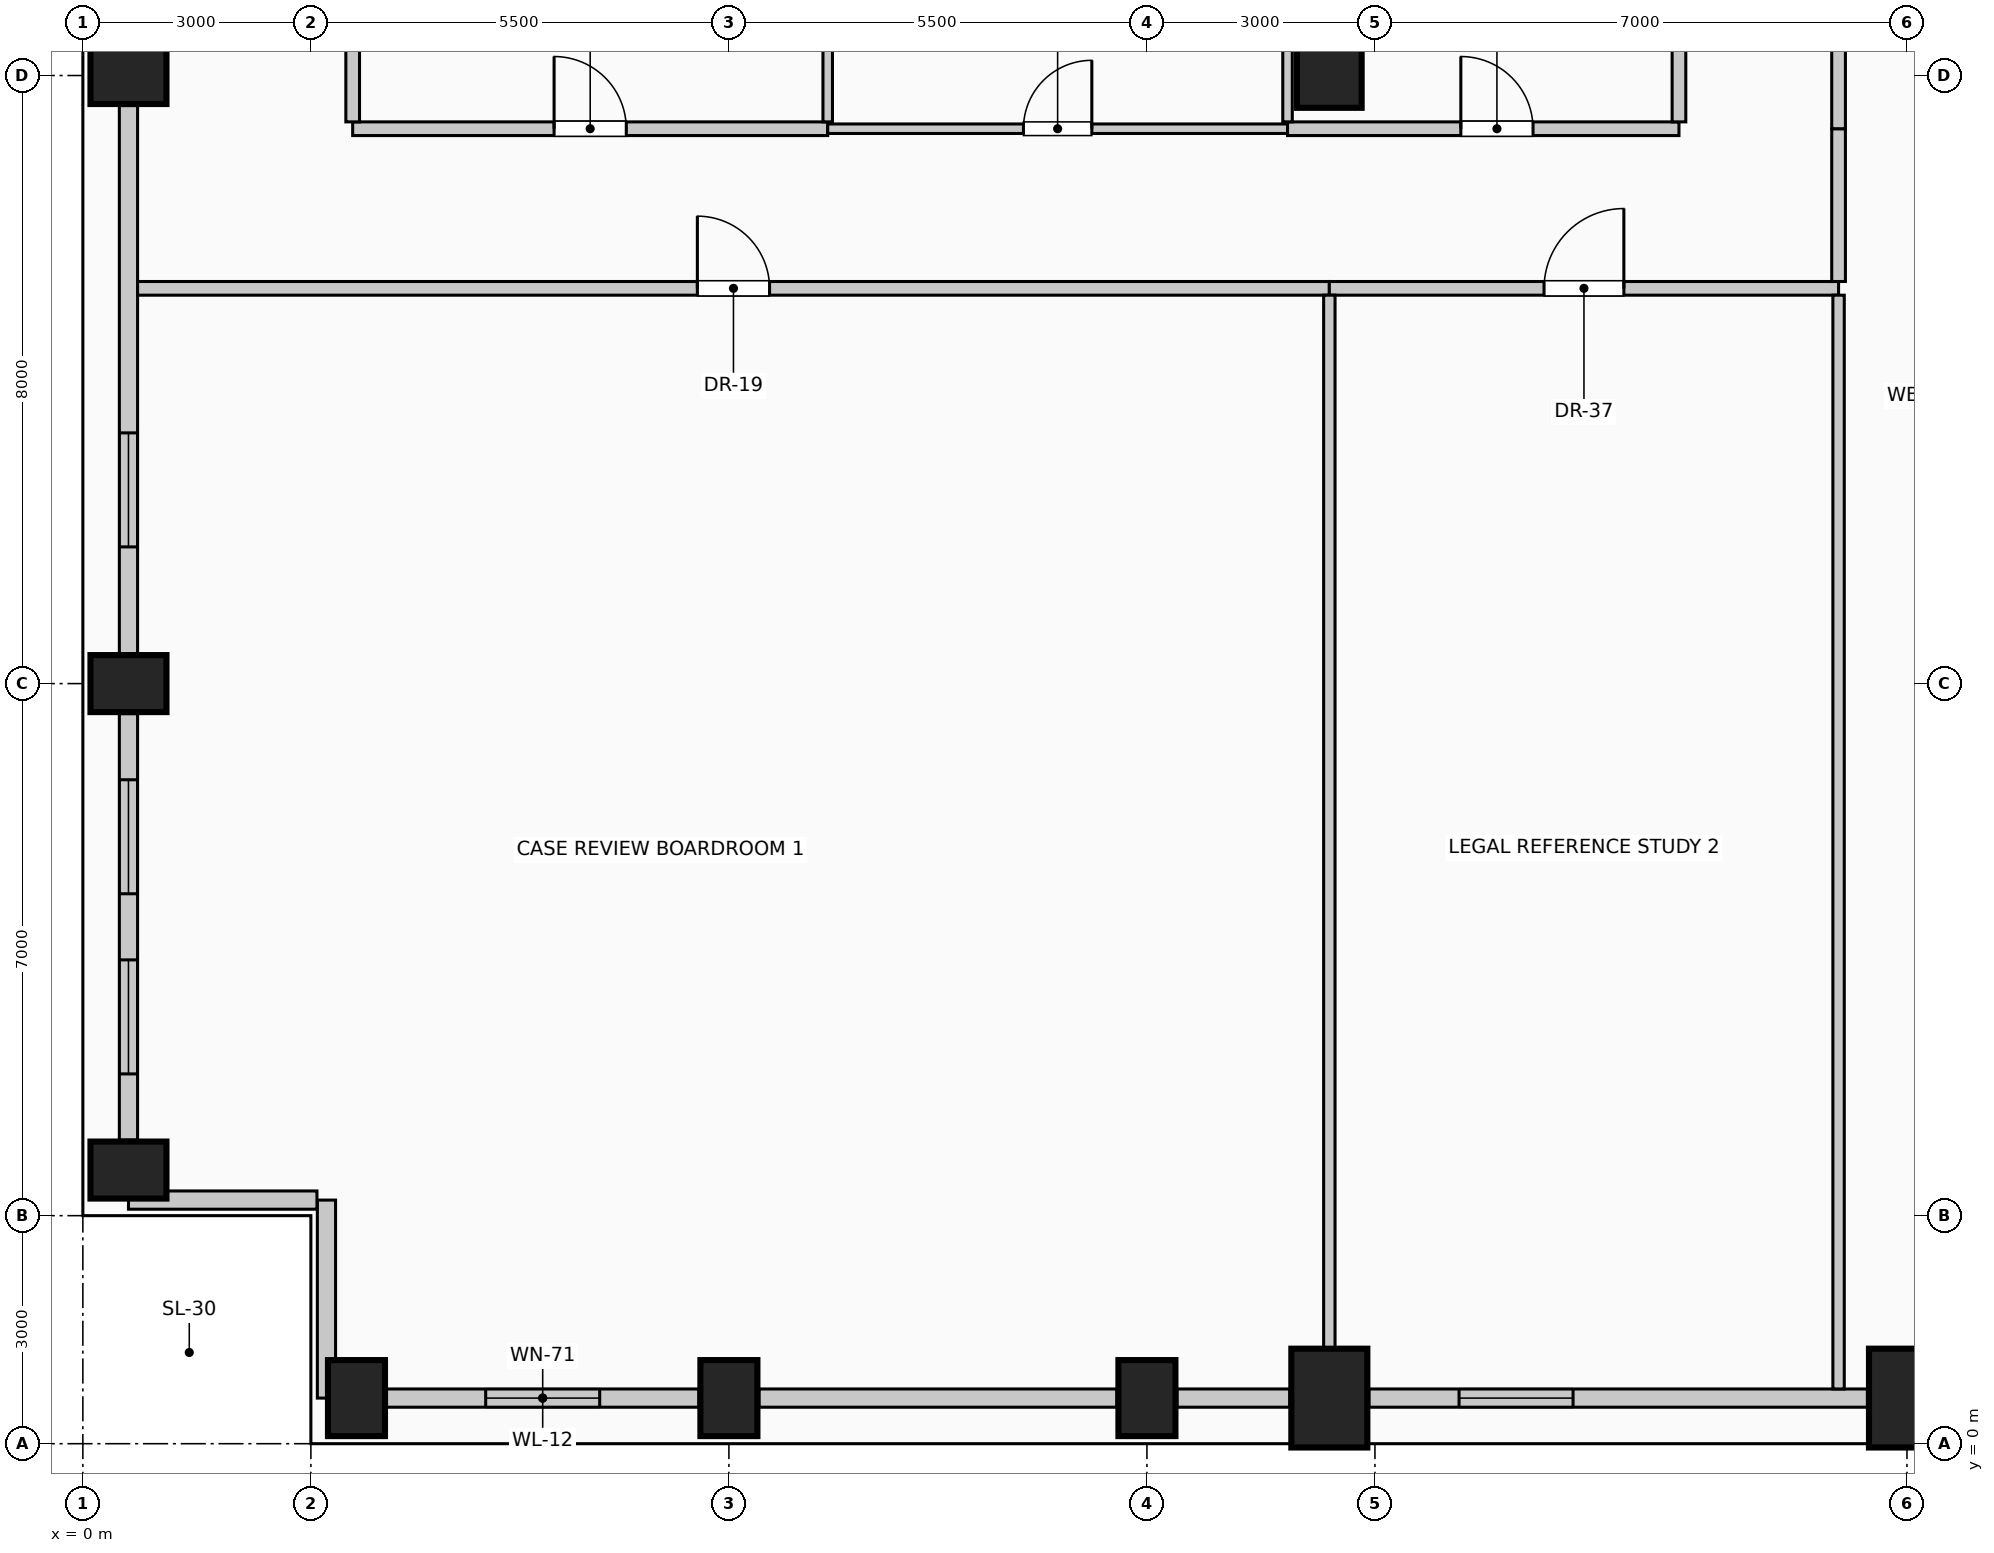
"""IFC4 building model, lengths in metres.
Left out: names, types, materials, properties, quantities, classifications, styles, units other than length and angle.
Written with IfcOpenShell. Run it as: python <this file> out.ifc"""

import sys

from ifc_helpers import new_model, si_unit, direction, frame, frame_2d, origin, origin_2d, place, context, subcontext, project, spatial, rectangle, circle, extrude, element, fill, save


model = new_model("IFC4")
c1 = context("Model", 3, precision=1e-05, world=origin(), true_north=direction((0.0, 1.0)))
c2 = subcontext(c1, "Body", "Model", "MODEL_VIEW")
j1 = project(units=[si_unit("LENGTHUNIT", "METRE"), si_unit("PLANEANGLEUNIT", "RADIAN")], contexts=[c1])
p1 = place(None, origin())
s1 = spatial("IfcSite", under=j1, at=p1, CompositionType="ELEMENT")
p2 = place(p1, origin())
s2 = spatial("IfcBuilding", under=s1, at=p2, CompositionType="ELEMENT")
p3 = place(p2, frame((0.0, 0.0, 234.6)))
s3 = spatial("IfcBuildingStorey", under=s2, at=p3, CompositionType="ELEMENT", Elevation=234.6)
for number, where, z_axis, x_axis in (
    (1, (3.6, 0.6, 0.0), (0.0, 0.0, 1.0), (1.0, 0.0, 0.0)),
    (2, (8.5, 0.6, 0.0), (0.0, 0.0, 1.0), (1.0, 0.0, 0.0)),
    (3, (14.0, 0.6, 0.0), (0.0, 0.0, 1.0), (1.0, 0.0, 0.0)),
):
    element("IfcColumn", number, at=place(p3, frame(where, z_axis=z_axis, x_axis=x_axis)), inside=s3, PredefinedType="COLUMN", context=c2, shape_type="SweptSolid", body=[
        extrude(rectangle(XDim=0.75, YDim=1.0, at=origin_2d()), origin(), (0.0, 0.0, 1.0), 4.0),
    ])
for number, where, z_axis, x_axis in (
    (4, (16.4, 0.6, 0.0), (0.0, 0.0, 1.0), (1.0, 0.0, 0.0)),
    (5, (24.0, 0.6, 0.0), (0.0, 0.0, 1.0), (1.0, 0.0, 0.0)),
):
    element("IfcColumn", number, at=place(p3, frame(where, z_axis=z_axis, x_axis=x_axis)), inside=s3, PredefinedType="COLUMN", context=c2, shape_type="SweptSolid", body=[
        extrude(rectangle(XDim=1.0, YDim=1.3, at=origin_2d()), origin(), (0.0, 0.0, 1.0), 4.0),
    ])
for number, where, z_axis, x_axis in (
    (6, (0.6, 3.6, 0.0), (0.0, 0.0, 1.0), (0.0, 1.0, 0.0)),
    (7, (0.6, 10.0, 0.0), (0.0, 0.0, 1.0), (0.0, 1.0, 0.0)),
    (8, (0.6, 18.0, 0.0), (0.0, 0.0, 1.0), (0.0, 1.0, 0.0)),
):
    element("IfcColumn", number, at=place(p3, frame(where, z_axis=z_axis, x_axis=x_axis)), inside=s3, PredefinedType="COLUMN", context=c2, shape_type="SweptSolid", body=[
        extrude(rectangle(XDim=0.75, YDim=1.0, at=origin_2d()), origin(), (0.0, 0.0, 1.0), 4.0),
    ])
p4 = place(p3, frame((16.4, 18.0, 0.0), z_axis=(0.0, 0.0, 1.0), x_axis=(1.0, 0.0, 0.0)))
e9 = element("IfcColumn", 9, at=p4, inside=s3, PredefinedType="COLUMN", context=c2, shape_type="SweptSolid", body=[
    extrude(circle(Radius=0.425, at=origin_2d()), origin(), (0.0, 0.0, 1.0), 4.0),
])
p5 = place(p3, frame((8.105, 0.6, 0.0), z_axis=(0.0, 0.0, 1.0), x_axis=(-1.0, 0.0, 0.0)))
e10 = element("IfcWall", 10, at=p5, inside=s3, PredefinedType="SOLIDWALL", context=c2, shape_type="SweptSolid", body=[
    extrude(rectangle(XDim=4.11, YDim=0.24, at=frame_2d((2.055, 0.0))), origin(), (0.0, 0.0, 1.0), 2.91),
])
p6 = place(p5, frame((1.305, 0.0, 0.42)))
e11 = element("IfcOpeningElement", 11, at=p6, cuts=e10, PredefinedType="OPENING", context=c2, shape_type="SweptSolid", body=[
    extrude(rectangle(XDim=1.5, YDim=2.2, at=frame_2d((0.75, 1.1))), frame((0.0, 0.13, 0.0), z_axis=(0.0, -1.0, 0.0), x_axis=(1.0, 0.0, 0.0)), (0.0, 0.0, 1.0), 0.26),
])
p7 = place(p3, frame((13.605, 0.6, 0.0), z_axis=(0.0, 0.0, 1.0), x_axis=(-1.0, 0.0, 0.0)))
e12 = element("IfcWall", 12, at=p7, inside=s3, PredefinedType="SOLIDWALL", context=c2, shape_type="SweptSolid", body=[
    extrude(rectangle(XDim=4.71, YDim=0.24, at=frame_2d((2.355, 0.0))), origin(), (0.0, 0.0, 1.0), 2.91),
])
p8 = place(p3, frame((15.88, 0.6, 0.0), z_axis=(0.0, 0.0, 1.0), x_axis=(-1.0, 0.0, 0.0)))
e13 = element("IfcWall", 13, at=p8, inside=s3, PredefinedType="SOLIDWALL", context=c2, shape_type="SweptSolid", body=[
    extrude(rectangle(XDim=1.485, YDim=0.24, at=frame_2d((0.742, 0.0))), origin(), (0.0, 0.0, 1.0), 2.91),
])
p9 = place(p3, frame((23.48, 0.6, 0.0), z_axis=(0.0, 0.0, 1.0), x_axis=(-1.0, 0.0, 0.0)))
e14 = element("IfcWall", 14, at=p9, inside=s3, PredefinedType="SOLIDWALL", context=c2, shape_type="SweptSolid", body=[
    extrude(rectangle(XDim=6.56, YDim=0.24, at=frame_2d((3.28, 0.0))), origin(), (0.0, 0.0, 1.0), 2.91),
])
p10 = place(p9, frame((3.873, 0.0, 0.42)))
e15 = element("IfcOpeningElement", 15, at=p10, cuts=e14, PredefinedType="OPENING", context=c2, shape_type="SweptSolid", body=[
    extrude(rectangle(XDim=1.5, YDim=2.2, at=frame_2d((0.75, 1.1))), frame((0.0, 0.13, 0.0), z_axis=(0.0, -1.0, 0.0), x_axis=(1.0, 0.0, 0.0)), (0.0, 0.0, 1.0), 0.26),
])
p11 = place(p3, frame((0.6, 3.995, 0.0), z_axis=(0.0, 0.0, 1.0), x_axis=(0.0, 1.0, 0.0)))
e16 = element("IfcWall", 16, at=p11, inside=s3, PredefinedType="SOLIDWALL", context=c2, shape_type="SweptSolid", body=[
    extrude(rectangle(XDim=5.61, YDim=0.24, at=frame_2d((2.805, 0.0))), origin(), (0.0, 0.0, 1.0), 2.91),
])
p12 = place(p11, frame((0.87, 0.0, 0.42)))
e17 = element("IfcOpeningElement", 17, at=p12, cuts=e16, PredefinedType="OPENING", context=c2, shape_type="SweptSolid", body=[
    extrude(rectangle(XDim=1.5, YDim=2.2, at=frame_2d((0.75, 1.1))), frame((0.0, 0.13, 0.0), z_axis=(0.0, -1.0, 0.0), x_axis=(1.0, 0.0, 0.0)), (0.0, 0.0, 1.0), 0.26),
])
p13 = place(p11, frame((3.24, 0.0, 0.42)))
e18 = element("IfcOpeningElement", 18, at=p13, cuts=e16, PredefinedType="OPENING", context=c2, shape_type="SweptSolid", body=[
    extrude(rectangle(XDim=1.5, YDim=2.2, at=frame_2d((0.75, 1.1))), frame((0.0, 0.13, 0.0), z_axis=(0.0, -1.0, 0.0), x_axis=(1.0, 0.0, 0.0)), (0.0, 0.0, 1.0), 0.26),
])
p14 = place(p3, frame((0.6, 10.395, 0.0), z_axis=(0.0, 0.0, 1.0), x_axis=(0.0, 1.0, 0.0)))
e19 = element("IfcWall", 19, at=p14, inside=s3, PredefinedType="SOLIDWALL", context=c2, shape_type="SweptSolid", body=[
    extrude(rectangle(XDim=7.21, YDim=0.24, at=frame_2d((3.605, 0.0))), origin(), (0.0, 0.0, 1.0), 2.91),
])
p15 = place(p14, frame((1.403, 0.0, 0.42)))
e20 = element("IfcOpeningElement", 20, at=p15, cuts=e19, PredefinedType="OPENING", context=c2, shape_type="SweptSolid", body=[
    extrude(rectangle(XDim=1.5, YDim=2.2, at=frame_2d((0.75, 1.1))), frame((0.0, 0.13, 0.0), z_axis=(0.0, -1.0, 0.0), x_axis=(1.0, 0.0, 0.0)), (0.0, 0.0, 1.0), 0.26),
])
p16 = place(p3, frame((3.205, 0.6, 0.0), z_axis=(0.0, 0.0, 1.0), x_axis=(0.0, 1.0, 0.0)))
e21 = element("IfcWall", 21, at=p16, inside=s3, PredefinedType="SOLIDWALL", context=c2, shape_type="SweptSolid", body=[
    extrude(rectangle(XDim=2.605, YDim=0.24, at=frame_2d((1.302, 0.0))), origin(), (0.0, 0.0, 1.0), 3.66),
])
p17 = place(p3, frame((3.08, 3.205, 0.0), z_axis=(0.0, 0.0, 1.0), x_axis=(-1.0, 0.0, 0.0)))
e22 = element("IfcWall", 22, at=p17, inside=s3, PredefinedType="SOLIDWALL", context=c2, shape_type="SweptSolid", body=[
    extrude(rectangle(XDim=2.48, YDim=0.24, at=frame_2d((1.24, 0.0))), origin(), (0.0, 0.0, 1.0), 3.66),
])
p18 = place(p3, frame((0.72, 15.2, 0.0), z_axis=(0.0, 0.0, 1.0), x_axis=(1.0, 0.0, 0.0)))
e23 = element("IfcWall", 23, at=p18, inside=s3, PredefinedType="PARTITIONING", context=c2, shape_type="SweptSolid", body=[
    extrude(rectangle(XDim=15.68, YDim=0.18, at=frame_2d((7.84, 0.0))), origin(), (0.0, 0.0, 1.0), 3.66),
])
p19 = place(p18, frame((7.365, 0.0, 0.0)))
e24 = element("IfcOpeningElement", 24, at=p19, cuts=e23, PredefinedType="OPENING", context=c2, shape_type="SweptSolid", body=[
    extrude(rectangle(XDim=0.95, YDim=2.15, at=frame_2d((0.475, 1.075))), frame((0.0, 0.1, 0.0), z_axis=(0.0, -1.0, 0.0), x_axis=(1.0, 0.0, 0.0)), (0.0, 0.0, 1.0), 0.2),
])
p20 = place(p3, frame((16.4, 15.2, 0.0), z_axis=(0.0, 0.0, 1.0), x_axis=(1.0, 0.0, 0.0)))
e25 = element("IfcWall", 25, at=p20, inside=s3, PredefinedType="PARTITIONING", context=c2, shape_type="SweptSolid", body=[
    extrude(rectangle(XDim=6.7, YDim=0.18, at=frame_2d((3.35, 0.0))), origin(), (0.0, 0.0, 1.0), 3.66),
])
p21 = place(p20, frame((2.825, 0.0, 0.0)))
e26 = element("IfcOpeningElement", 26, at=p21, cuts=e25, PredefinedType="OPENING", context=c2, shape_type="SweptSolid", body=[
    extrude(rectangle(XDim=1.05, YDim=2.15, at=frame_2d((0.525, 1.075))), frame((0.0, 0.1, 0.0), z_axis=(0.0, -1.0, 0.0), x_axis=(1.0, 0.0, 0.0)), (0.0, 0.0, 1.0), 0.2),
])
p22 = place(p3, frame((3.55, 17.3, 0.0), z_axis=(0.0, 0.0, 1.0), x_axis=(1.0, 0.0, 0.0)))
e27 = element("IfcWall", 27, at=p22, inside=s3, PredefinedType="PARTITIONING", context=c2, shape_type="SweptSolid", body=[
    extrude(rectangle(XDim=6.25, YDim=0.18, at=frame_2d((3.125, 0.0))), origin(), (0.0, 0.0, 1.0), 3.66),
])
p23 = place(p22, frame((2.65, 0.0, 0.0)))
e28 = element("IfcOpeningElement", 28, at=p23, cuts=e27, PredefinedType="OPENING", context=c2, shape_type="SweptSolid", body=[
    extrude(rectangle(XDim=0.95, YDim=2.15, at=frame_2d((0.475, 1.075))), frame((0.0, 0.1, 0.0), z_axis=(0.0, -1.0, 0.0), x_axis=(1.0, 0.0, 0.0)), (0.0, 0.0, 1.0), 0.2),
])
p24 = place(p3, frame((9.8, 17.3, 0.0), z_axis=(0.0, 0.0, 1.0), x_axis=(1.0, 0.0, 0.0)))
e29 = element("IfcWall", 29, at=p24, inside=s3, PredefinedType="PARTITIONING", context=c2, shape_type="SweptSolid", body=[
    extrude(rectangle(XDim=6.05, YDim=0.125, at=frame_2d((3.025, 0.0))), origin(), (0.0, 0.0, 1.0), 3.66),
])
p25 = place(p24, frame((2.575, 0.0, 0.0)))
e30 = element("IfcOpeningElement", 30, at=p25, cuts=e29, PredefinedType="OPENING", context=c2, shape_type="SweptSolid", body=[
    extrude(rectangle(XDim=0.9, YDim=2.1, at=frame_2d((0.45, 1.05))), frame((0.0, 0.073, 0.0), z_axis=(0.0, -1.0, 0.0), x_axis=(1.0, 0.0, 0.0)), (0.0, 0.0, 1.0), 0.145),
])
p26 = place(p3, frame((15.85, 17.3, 0.0), z_axis=(0.0, 0.0, 1.0), x_axis=(1.0, 0.0, 0.0)))
e31 = element("IfcWall", 31, at=p26, inside=s3, PredefinedType="PARTITIONING", context=c2, shape_type="SweptSolid", body=[
    extrude(rectangle(XDim=5.15, YDim=0.18, at=frame_2d((2.575, 0.0))), origin(), (0.0, 0.0, 1.0), 3.66),
])
p27 = place(p26, frame((2.28, 0.0, 0.0)))
e32 = element("IfcOpeningElement", 32, at=p27, cuts=e31, PredefinedType="OPENING", context=c2, shape_type="SweptSolid", body=[
    extrude(rectangle(XDim=0.95, YDim=2.15, at=frame_2d((0.475, 1.075))), frame((0.0, 0.1, 0.0), z_axis=(0.0, -1.0, 0.0), x_axis=(1.0, 0.0, 0.0)), (0.0, 0.0, 1.0), 0.2),
])
p28 = place(p3, frame((3.55, 17.39, 0.0), z_axis=(0.0, 0.0, 1.0), x_axis=(0.0, 1.0, 0.0)))
e33 = element("IfcWall", 33, at=p28, inside=s3, PredefinedType="PARTITIONING", context=c2, shape_type="SweptSolid", body=[
    extrude(rectangle(XDim=7.335, YDim=0.18, at=frame_2d((3.667, 0.0))), origin(), (0.0, 0.0, 1.0), 3.66),
])
for number, where, z_axis, x_axis in (
    (34, (9.8, 17.39, 0.0), (0.0, 0.0, 1.0), (0.0, 1.0, 0.0)),
    (35, (15.85, 17.39, 0.0), (0.0, 0.0, 1.0), (0.0, 1.0, 0.0)),
):
    element("IfcWall", number, at=place(p3, frame(where, z_axis=z_axis, x_axis=x_axis)), inside=s3, PredefinedType="PARTITIONING", context=c2, shape_type="SweptSolid", body=[
        extrude(rectangle(XDim=7.335, YDim=0.125, at=frame_2d((3.667, 0.0))), origin(), (0.0, 0.0, 1.0), 3.66),
    ])
p29 = place(p3, frame((16.4, 1.25, 0.0), z_axis=(0.0, 0.0, 1.0), x_axis=(0.0, 1.0, 0.0)))
e36 = element("IfcWall", 36, at=p29, inside=s3, PredefinedType="PARTITIONING", context=c2, shape_type="SweptSolid", body=[
    extrude(rectangle(XDim=13.86, YDim=0.15, at=frame_2d((6.93, 0.0))), origin(), (0.0, 0.0, 1.0), 3.055),
])
p30 = place(p3, frame((21.0, 17.39, 0.0), z_axis=(0.0, 0.0, 1.0), x_axis=(0.0, 1.0, 0.0)))
e37 = element("IfcWall", 37, at=p30, inside=s3, PredefinedType="PARTITIONING", context=c2, shape_type="SweptSolid", body=[
    extrude(rectangle(XDim=7.335, YDim=0.18, at=frame_2d((3.667, 0.0))), origin(), (0.0, 0.0, 1.0), 3.66),
])
p31 = place(p3, frame((23.1, 0.72, 0.0), z_axis=(0.0, 0.0, 1.0), x_axis=(0.0, 1.0, 0.0)))
e38 = element("IfcWall", 38, at=p31, inside=s3, PredefinedType="PARTITIONING", context=c2, shape_type="SweptSolid", body=[
    extrude(rectangle(XDim=14.39, YDim=0.15, at=frame_2d((7.195, 0.0))), origin(), (0.0, 0.0, 1.0), 3.66),
])
p32 = place(p3, frame((23.1, 15.29, 0.0), z_axis=(0.0, 0.0, 1.0), x_axis=(0.0, 1.0, 0.0)))
e39 = element("IfcWall", 39, at=p32, inside=s3, PredefinedType="PARTITIONING", context=c2, shape_type="SweptSolid", body=[
    extrude(rectangle(XDim=2.01, YDim=0.18, at=frame_2d((1.005, 0.0))), origin(), (0.0, 0.0, 1.0), 3.66),
])
p33 = place(p3, frame((23.1, 17.3, 0.0), z_axis=(0.0, 0.0, 1.0), x_axis=(0.0, 1.0, 0.0)))
e40 = element("IfcWall", 40, at=p33, inside=s3, PredefinedType="PARTITIONING", context=c2, shape_type="SweptSolid", body=[
    extrude(rectangle(XDim=9.51, YDim=0.18, at=frame_2d((4.755, 0.0))), origin(), (0.0, 0.0, 1.0), 3.66),
])
p34 = place(p6, origin())
e41 = element("IfcWindow", 41, at=p34, inside=s3, PartitioningType="SINGLE_PANEL", PredefinedType="WINDOW", context=c2, shape_type="SweptSolid", body=[
    extrude(rectangle(XDim=1.5, YDim=2.2, at=frame_2d((0.75, 1.1))), frame((0.0, 0.03, 0.0), z_axis=(0.0, -1.0, 0.0), x_axis=(1.0, 0.0, 0.0)), (0.0, 0.0, 1.0), 0.06),
])
fill(e11, e41)
p35 = place(p10, origin())
e42 = element("IfcWindow", 42, at=p35, inside=s3, PartitioningType="SINGLE_PANEL", PredefinedType="WINDOW", context=c2, shape_type="SweptSolid", body=[
    extrude(rectangle(XDim=1.5, YDim=2.2, at=frame_2d((0.75, 1.1))), frame((0.0, 0.03, 0.0), z_axis=(0.0, -1.0, 0.0), x_axis=(1.0, 0.0, 0.0)), (0.0, 0.0, 1.0), 0.06),
])
fill(e15, e42)
p36 = place(p12, origin())
e43 = element("IfcWindow", 43, at=p36, inside=s3, PartitioningType="SINGLE_PANEL", PredefinedType="WINDOW", context=c2, shape_type="SweptSolid", body=[
    extrude(rectangle(XDim=1.5, YDim=2.2, at=frame_2d((0.75, 1.1))), frame((0.0, 0.03, 0.0), z_axis=(0.0, -1.0, 0.0), x_axis=(1.0, 0.0, 0.0)), (0.0, 0.0, 1.0), 0.06),
])
fill(e17, e43)
p37 = place(p13, origin())
e44 = element("IfcWindow", 44, at=p37, inside=s3, PartitioningType="SINGLE_PANEL", PredefinedType="WINDOW", context=c2, shape_type="SweptSolid", body=[
    extrude(rectangle(XDim=1.5, YDim=2.2, at=frame_2d((0.75, 1.1))), frame((0.0, 0.03, 0.0), z_axis=(0.0, -1.0, 0.0), x_axis=(1.0, 0.0, 0.0)), (0.0, 0.0, 1.0), 0.06),
])
fill(e18, e44)
p38 = place(p15, origin())
e45 = element("IfcWindow", 45, at=p38, inside=s3, PartitioningType="SINGLE_PANEL", PredefinedType="WINDOW", context=c2, shape_type="SweptSolid", body=[
    extrude(rectangle(XDim=1.5, YDim=2.2, at=frame_2d((0.75, 1.1))), frame((0.0, 0.03, 0.0), z_axis=(0.0, -1.0, 0.0), x_axis=(1.0, 0.0, 0.0)), (0.0, 0.0, 1.0), 0.06),
])
fill(e20, e45)
p39 = place(p19, origin())
e46 = element("IfcDoor", 46, at=p39, inside=s3, OperationType="SINGLE_SWING_LEFT", PredefinedType="DOOR", context=c2, shape_type="SweptSolid", body=[
    extrude(rectangle(XDim=0.95, YDim=2.15, at=frame_2d((0.475, 1.075))), frame((0.0, 0.025, 0.0), z_axis=(0.0, -1.0, 0.0), x_axis=(1.0, 0.0, 0.0)), (0.0, 0.0, 1.0), 0.05),
])
fill(e24, e46)
p40 = place(p21, origin())
e47 = element("IfcDoor", 47, at=p40, inside=s3, OperationType="SINGLE_SWING_RIGHT", PredefinedType="DOOR", context=c2, shape_type="SweptSolid", body=[
    extrude(rectangle(XDim=1.05, YDim=2.15, at=frame_2d((0.525, 1.075))), frame((0.0, 0.025, 0.0), z_axis=(0.0, -1.0, 0.0), x_axis=(1.0, 0.0, 0.0)), (0.0, 0.0, 1.0), 0.05),
])
fill(e26, e47)
p41 = place(p23, origin())
e48 = element("IfcDoor", 48, at=p41, inside=s3, OperationType="SINGLE_SWING_LEFT", PredefinedType="DOOR", context=c2, shape_type="SweptSolid", body=[
    extrude(rectangle(XDim=0.95, YDim=2.15, at=frame_2d((0.475, 1.075))), frame((0.0, 0.025, 0.0), z_axis=(0.0, -1.0, 0.0), x_axis=(1.0, 0.0, 0.0)), (0.0, 0.0, 1.0), 0.05),
])
fill(e28, e48)
p42 = place(p25, origin())
e49 = element("IfcDoor", 49, at=p42, inside=s3, OperationType="SINGLE_SWING_RIGHT", PredefinedType="DOOR", context=c2, shape_type="SweptSolid", body=[
    extrude(rectangle(XDim=0.9, YDim=2.1, at=frame_2d((0.45, 1.05))), frame((0.0, 0.025, 0.0), z_axis=(0.0, -1.0, 0.0), x_axis=(1.0, 0.0, 0.0)), (0.0, 0.0, 1.0), 0.05),
])
fill(e30, e49)
p43 = place(p27, origin())
e50 = element("IfcDoor", 50, at=p43, inside=s3, OperationType="SINGLE_SWING_LEFT", PredefinedType="DOOR", context=c2, shape_type="SweptSolid", body=[
    extrude(rectangle(XDim=0.95, YDim=2.15, at=frame_2d((0.475, 1.075))), frame((0.0, 0.025, 0.0), z_axis=(0.0, -1.0, 0.0), x_axis=(1.0, 0.0, 0.0)), (0.0, 0.0, 1.0), 0.05),
])
fill(e32, e50)
save(model, sys.argv[1])
